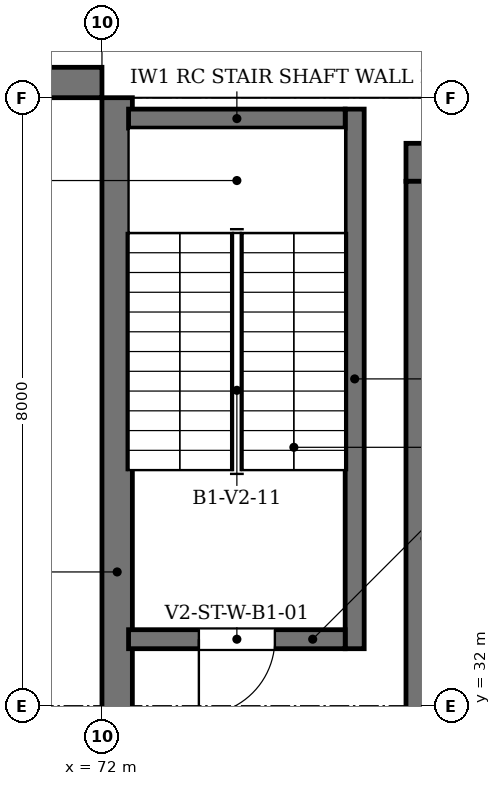
"""IFC4 building model, lengths in metres.
Left out: names, types, materials, properties, quantities, classifications, styles, units other than length and angle.
Written with IfcOpenShell. Run it as: python <this file> out.ifc"""

import sys

from ifc_helpers import new_model, si_unit, direction, frame, frame_2d, origin, place, context, subcontext, project, spatial, rectangle, extrude, element, fill, save


model = new_model("IFC4")
c1 = context("Model", 3, precision=1e-05, world=origin(), true_north=direction((0.0, 1.0)))
c2 = subcontext(c1, "Body", "Model", "MODEL_VIEW")
j1 = project(units=[si_unit("LENGTHUNIT", "METRE"), si_unit("PLANEANGLEUNIT", "RADIAN")], contexts=[c1])
p1 = place(None, origin())
s1 = spatial("IfcSite", under=j1, at=p1, CompositionType="ELEMENT")
p2 = place(p1, origin())
s2 = spatial("IfcBuilding", under=s1, at=p2, CompositionType="ELEMENT")
p3 = place(p2, frame((0.0, 0.0, -4.8)))
s3 = spatial("IfcBuildingStorey", under=s2, at=p3, CompositionType="ELEMENT", Elevation=-4.8)
p4 = place(p3, frame((76.0, 39.15, 0.0), z_axis=(0.0, 0.0, 1.0), x_axis=(1.0, 0.0, 0.0)))
e1 = element("IfcWall", 1, at=p4, inside=s3, PredefinedType="SHEAR", context=c2, shape_type="SweptSolid", body=[
    extrude(rectangle(XDim=24.0, YDim=0.5, at=frame_2d((12.0, 0.0))), origin(), (0.0, 0.0, 1.0), 4.38),
])
p5 = place(p3, frame((76.25, 16.5, 0.0), z_axis=(0.0, 0.0, 1.0), x_axis=(0.0, 1.0, 0.0)))
e2 = element("IfcWall", 2, at=p5, inside=s3, PredefinedType="SHEAR", context=c2, shape_type="SweptSolid", body=[
    extrude(rectangle(XDim=22.4, YDim=0.5, at=frame_2d((11.2, 0.0))), origin(), (0.0, 0.0, 1.0), 4.38),
])
p6 = place(p5, frame((4.25, 0.0, 0.0)))
e3 = element("IfcOpeningElement", 3, at=p6, cuts=e2, PredefinedType="OPENING", context=c2, shape_type="SweptSolid", body=[
    extrude(rectangle(XDim=1.5, YDim=2.7, at=frame_2d((0.75, 1.35))), frame((0.0, 0.26, 0.0), z_axis=(0.0, -1.0, 0.0), x_axis=(1.0, 0.0, 0.0)), (0.0, 0.0, 1.0), 0.52),
])
p7 = place(p5, frame((12.725, 0.0, 0.0)))
e4 = element("IfcOpeningElement", 4, at=p7, cuts=e2, PredefinedType="OPENING", context=c2, shape_type="SweptSolid", body=[
    extrude(rectangle(XDim=1.2, YDim=2.1, at=frame_2d((0.6, 1.05))), frame((0.0, 0.26, 0.0), z_axis=(0.0, -1.0, 0.0), x_axis=(1.0, 0.0, 0.0)), (0.0, 0.0, 1.0), 0.52),
])
p8 = place(p3, frame((68.0, 40.2, 0.0), z_axis=(0.0, 0.0, 1.0), x_axis=(1.0, 0.0, 0.0)))
e5 = element("IfcWall", 5, at=p8, inside=s3, PredefinedType="SOLIDWALL", context=c2, shape_type="SweptSolid", body=[
    extrude(rectangle(XDim=4.0, YDim=0.4, at=frame_2d((2.0, 0.0))), origin(), (0.0, 0.0, 1.0), 4.38),
])
p9 = place(p3, frame((72.2, -1.6, 0.0), z_axis=(0.0, 0.0, 1.0), x_axis=(0.0, 1.0, 0.0)))
e6 = element("IfcWall", 6, at=p9, inside=s3, PredefinedType="SOLIDWALL", context=c2, shape_type="SweptSolid", body=[
    extrude(rectangle(XDim=41.6, YDim=0.4, at=frame_2d((20.8, 0.0))), origin(), (0.0, 0.0, 1.0), 4.38),
])
p10 = place(p3, frame((75.325, 32.75, 0.0), z_axis=(0.0, 0.0, 1.0), x_axis=(0.0, 1.0, 0.0)))
e7 = element("IfcWall", 7, at=p10, inside=s3, PredefinedType="SOLIDWALL", context=c2, shape_type="SweptSolid", body=[
    extrude(rectangle(XDim=7.1, YDim=0.25, at=frame_2d((3.55, 0.0))), origin(), (0.0, 0.0, 1.0), 4.8),
])
p11 = place(p3, frame((72.35, 32.875, 0.0), z_axis=(0.0, 0.0, 1.0), x_axis=(1.0, 0.0, 0.0)))
e8 = element("IfcWall", 8, at=p11, inside=s3, PredefinedType="SOLIDWALL", context=c2, shape_type="SweptSolid", body=[
    extrude(rectangle(XDim=2.85, YDim=0.25, at=frame_2d((1.425, 0.0))), origin(), (0.0, 0.0, 1.0), 4.8),
])
p12 = place(p11, frame((0.925, 0.0, 0.0)))
e9 = element("IfcOpeningElement", 9, at=p12, cuts=e8, PredefinedType="OPENING", context=c2, shape_type="SweptSolid", body=[
    extrude(rectangle(XDim=1.0, YDim=2.1, at=frame_2d((0.5, 1.05))), frame((0.0, 0.135, 0.0), z_axis=(0.0, -1.0, 0.0), x_axis=(1.0, 0.0, 0.0)), (0.0, 0.0, 1.0), 0.27),
])
p13 = place(p3, frame((72.35, 39.725, 0.0), z_axis=(0.0, 0.0, 1.0), x_axis=(1.0, 0.0, 0.0)))
e10 = element("IfcWall", 10, at=p13, inside=s3, PredefinedType="SOLIDWALL", context=c2, shape_type="SweptSolid", body=[
    extrude(rectangle(XDim=2.85, YDim=0.25, at=frame_2d((1.425, 0.0))), origin(), (0.0, 0.0, 1.0), 4.8),
])
p14 = place(p12, frame((1.0, 0.0, 0.0), z_axis=(0.0, 0.0, 1.0), x_axis=(-1.0, 0.0, 0.0)))
e11 = element("IfcDoor", 11, at=p14, inside=s3, OperationType="SINGLE_SWING_LEFT", PredefinedType="DOOR", context=c2, shape_type="SweptSolid", body=[
    extrude(rectangle(XDim=1.0, YDim=2.1, at=frame_2d((0.5, 1.05))), frame((0.0, 0.025, 0.0), z_axis=(0.0, -1.0, 0.0), x_axis=(1.0, 0.0, 0.0)), (0.0, 0.0, 1.0), 0.05),
])
fill(e9, e11)
save(model, sys.argv[1])
